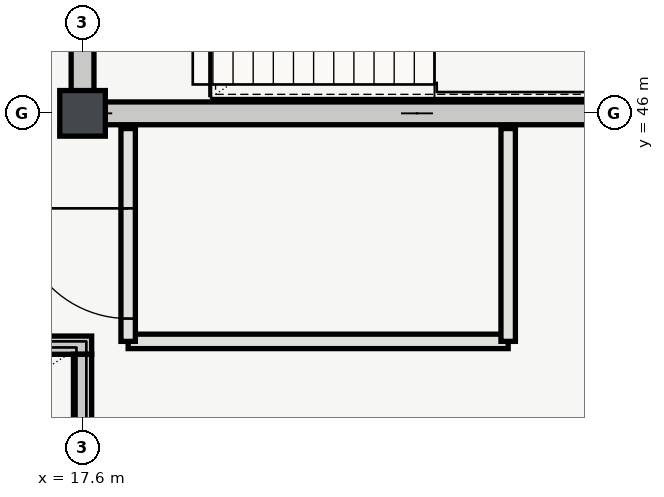
"""IFC4 building model, lengths in metres.
Left out: names, types, materials, properties, quantities, classifications, styles, units other than length and angle.
Written with IfcOpenShell. Run it as: python <this file> out.ifc"""

import sys

from ifc_helpers import new_model, si_unit, direction, frame, frame_2d, origin, origin_2d, place, context, subcontext, project, spatial, rectangle, extrude, element, fill, save


model = new_model("IFC4")
c1 = context("Model", 3, precision=1e-05, world=origin(), true_north=direction((0.0, 1.0)))
c2 = subcontext(c1, "Body", "Model", "MODEL_VIEW")
j1 = project(units=[si_unit("LENGTHUNIT", "METRE"), si_unit("PLANEANGLEUNIT", "RADIAN")], contexts=[c1])
p1 = place(None, origin())
s1 = spatial("IfcSite", under=j1, at=p1, CompositionType="ELEMENT")
p2 = place(p1, origin())
s2 = spatial("IfcBuilding", under=s1, at=p2, CompositionType="ELEMENT")
p3 = place(p2, frame((0.0, 0.0, 20.4)))
s3 = spatial("IfcBuildingStorey", under=s2, at=p3, CompositionType="ELEMENT", Elevation=20.4)
p4 = place(p3, frame((17.6, 46.0, 0.0), z_axis=(0.0, 0.0, 1.0), x_axis=(1.0, 0.0, 0.0)))
e1 = element("IfcColumn", 1, at=p4, inside=s3, PredefinedType="COLUMN", context=c2, shape_type="SweptSolid", body=[
    extrude(rectangle(XDim=0.6, YDim=0.6, at=origin_2d()), origin(), (0.0, 0.0, 1.0), 4.2),
])
p5 = place(p3, frame((17.45, 46.0, 0.0), z_axis=(0.0, 0.0, 1.0), x_axis=(1.0, 0.0, 0.0)))
e2 = element("IfcWall", 2, at=p5, inside=s3, PredefinedType="SHEAR", context=c2, shape_type="SweptSolid", body=[
    extrude(rectangle(XDim=9.1, YDim=0.3, at=frame_2d((4.55, 0.0))), origin(), (0.0, 0.0, 1.0), 3.92),
])
p6 = place(p3, frame((17.6, 46.15, 0.0), z_axis=(0.0, 0.0, 1.0), x_axis=(0.0, 1.0, 0.0)))
e3 = element("IfcWall", 3, at=p6, inside=s3, PredefinedType="SHEAR", context=c2, shape_type="SweptSolid", body=[
    extrude(rectangle(XDim=7.7, YDim=0.3, at=frame_2d((3.85, 0.0))), origin(), (0.0, 0.0, 1.0), 3.92),
])
p7 = place(p6, frame((1.675, 0.0, 0.0)))
e4 = element("IfcOpeningElement", 4, at=p7, cuts=e3, PredefinedType="OPENING", context=c2, shape_type="SweptSolid", body=[
    extrude(rectangle(XDim=1.35, YDim=2.2, at=frame_2d((0.675, 1.1))), frame((0.0, 0.16, 0.0), z_axis=(0.0, -1.0, 0.0), x_axis=(1.0, 0.0, 0.0)), (0.0, 0.0, 1.0), 0.32),
])
p8 = place(p3, frame((18.2, 43.0, 0.0), z_axis=(0.0, 0.0, 1.0), x_axis=(1.0, 0.0, 0.0)))
e5 = element("IfcWall", 5, at=p8, inside=s3, PredefinedType="PARTITIONING", context=c2, shape_type="SweptSolid", body=[
    extrude(rectangle(XDim=5.0, YDim=0.19, at=frame_2d((2.5, 0.0))), origin(), (0.0, 0.0, 1.0), 3.92),
])
p9 = place(p3, frame((18.2, 45.8, 0.0), z_axis=(0.0, 0.0, 1.0), x_axis=(0.0, -1.0, 0.0)))
e6 = element("IfcWall", 6, at=p9, inside=s3, PredefinedType="PARTITIONING", context=c2, shape_type="SweptSolid", body=[
    extrude(rectangle(XDim=2.8, YDim=0.19, at=frame_2d((1.4, 0.0))), origin(), (0.0, 0.0, 1.0), 3.92),
])
p10 = place(p9, frame((1.05, 0.0, 0.0)))
e7 = element("IfcOpeningElement", 7, at=p10, cuts=e6, PredefinedType="OPENING", context=c2, shape_type="SweptSolid", body=[
    extrude(rectangle(XDim=1.45, YDim=2.2, at=frame_2d((0.725, 1.1))), frame((0.0, 0.105, 0.0), z_axis=(0.0, -1.0, 0.0), x_axis=(1.0, 0.0, 0.0)), (0.0, 0.0, 1.0), 0.21),
])
p11 = place(p3, frame((23.2, 43.0, 0.0), z_axis=(0.0, 0.0, 1.0), x_axis=(0.0, 1.0, 0.0)))
e8 = element("IfcWall", 8, at=p11, inside=s3, PredefinedType="PARTITIONING", context=c2, shape_type="SweptSolid", body=[
    extrude(rectangle(XDim=2.8, YDim=0.19, at=frame_2d((1.4, 0.0))), origin(), (0.0, 0.0, 1.0), 3.92),
])
p12 = place(p3, frame((17.72, 42.95, 0.0), z_axis=(0.0, 0.0, 1.0), x_axis=(-1.0, 0.0, 0.0)))
e9 = element("IfcWall", 9, at=p12, inside=s3, PredefinedType="SHEAR", context=c2, shape_type="SweptSolid", body=[
    extrude(rectangle(XDim=9.04, YDim=0.24, at=frame_2d((4.52, 0.0))), origin(), (0.0, 0.0, 1.0), 3.95),
])
p13 = place(p3, frame((17.6, 38.67, 0.0), z_axis=(0.0, 0.0, 1.0), x_axis=(0.0, 1.0, 0.0)))
e10 = element("IfcWall", 10, at=p13, inside=s3, PredefinedType="SHEAR", context=c2, shape_type="SweptSolid", body=[
    extrude(rectangle(XDim=4.16, YDim=0.24, at=frame_2d((2.08, 0.0))), origin(), (0.0, 0.0, 1.0), 3.95),
])
p14 = place(p10, origin())
e11 = element("IfcDoor", 11, at=p14, inside=s3, OperationType="SINGLE_SWING_LEFT", PredefinedType="DOOR", context=c2, shape_type="SweptSolid", body=[
    extrude(rectangle(XDim=1.45, YDim=2.2, at=frame_2d((0.725, 1.1))), frame((0.0, 0.025, 0.0), z_axis=(0.0, -1.0, 0.0), x_axis=(1.0, 0.0, 0.0)), (0.0, 0.0, 1.0), 0.05),
])
fill(e7, e11)
save(model, sys.argv[1])
